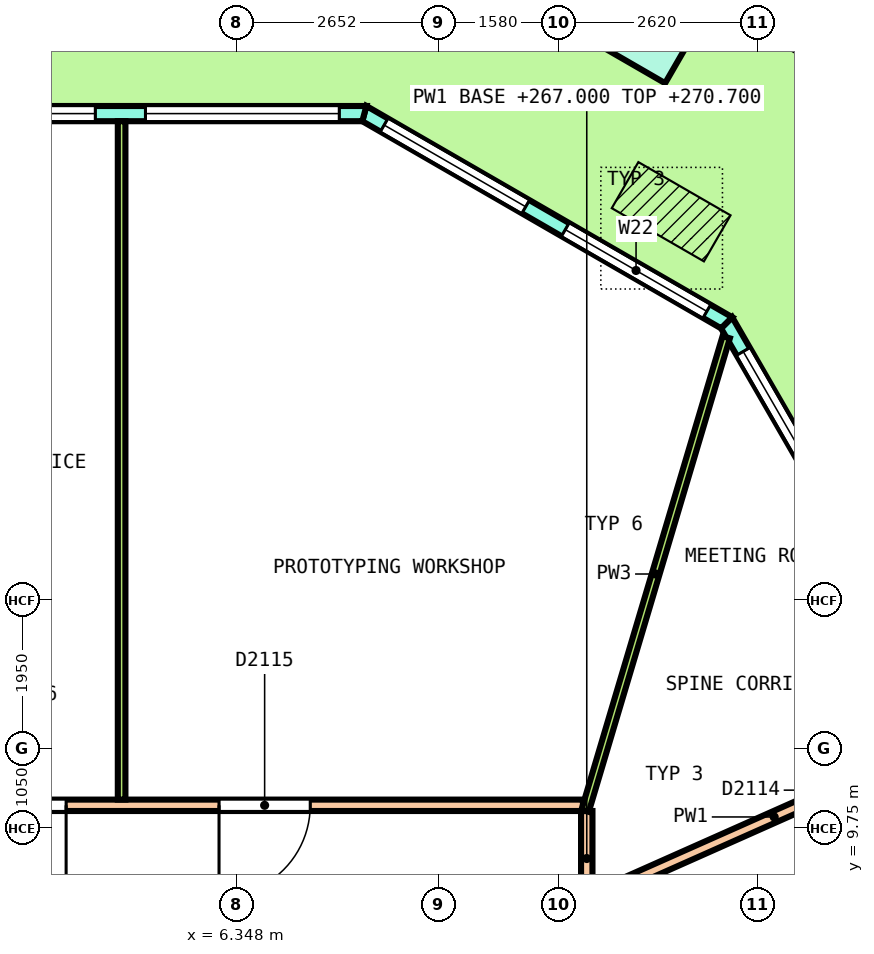
"""IFC4 building model, lengths in metres.
Left out: names, types, materials, properties, quantities, classifications, styles, units other than length and angle.
Written with IfcOpenShell. Run it as: python <this file> out.ifc"""

import sys

from ifc_helpers import new_model, si_unit, direction, frame, frame_2d, origin, origin_2d, place, context, subcontext, project, spatial, polyline, rectangle, outline, extrude, element, fill, save


model = new_model("IFC4")
c1 = context("Model", 3, precision=1e-05, world=origin(), true_north=direction((0.0, 1.0)))
c2 = subcontext(c1, "Body", "Model", "MODEL_VIEW")
j1 = project(units=[si_unit("LENGTHUNIT", "METRE"), si_unit("PLANEANGLEUNIT", "RADIAN")], contexts=[c1])
p1 = place(None, origin())
s1 = spatial("IfcSite", under=j1, at=p1, CompositionType="ELEMENT")
p2 = place(p1, origin())
s2 = spatial("IfcBuilding", under=s1, at=p2, CompositionType="ELEMENT")
p3 = place(p2, frame((0.0, 0.0, 267.0)))
s3 = spatial("IfcBuildingStorey", under=s2, at=p3, CompositionType="ELEMENT", Elevation=267.0)
p4 = place(p3, frame((11.807, 20.199, 0.0), z_axis=(0.036230378439, 0.0, 0.99934346432), x_axis=(-0.865314641241, 0.500246354177, 0.031371273281)))
e1 = element("IfcColumn", 1, at=p4, inside=s3, PredefinedType="COLUMN", context=c2, shape_type="SweptSolid", body=[
    extrude(rectangle(XDim=0.95, YDim=0.95, at=origin_2d()), origin(), (0.0, 0.0, 1.0), 3.652),
])
p5 = place(p3, frame((20.596, 2.877, 0.0), z_axis=(0.0, 0.0, 1.0), x_axis=(-0.500008968961, 0.86602022549, 0.0)))
e2 = element("IfcWall", 2, at=p5, inside=s3, PredefinedType="SOLIDWALL", context=c2, shape_type="SweptSolid", body=[
    extrude(outline(polyline([(-0.027, -0.1), (1.018, -0.1), (2.062, -0.1), (3.106, -0.1), (4.151, -0.1), (5.195, -0.1), (6.24, -0.1), (7.284, -0.1), (8.328, -0.1), (9.373, -0.1), (10.417, -0.1), (11.462, -0.1), (12.506, -0.1), (13.551, -0.1), (14.595, -0.1), (15.639, -0.1), (15.586, 0.1), (14.548, 0.1), (13.511, 0.1), (12.474, 0.1), (11.437, 0.1), (10.399, 0.1), (9.362, 0.1), (8.325, 0.1), (7.288, 0.1), (6.25, 0.1), (5.213, 0.1), (4.176, 0.1), (3.139, 0.1), (2.101, 0.1), (1.064, 0.1), (0.027, 0.1), (-0.027, -0.1)])), origin(), (0.0, 0.0, 1.0), 3.7),
])
p6 = place(p5, frame((0.436, 0.0, 0.1)))
e3 = element("IfcOpeningElement", 3, at=p6, cuts=e2, PredefinedType="OPENING", context=c2, shape_type="SweptSolid", body=[
    extrude(rectangle(XDim=2.25, YDim=2.75, at=frame_2d((1.125, 1.375))), frame((0.0, 0.11, 0.0), z_axis=(0.0, -1.0, 0.0), x_axis=(1.0, 0.0, 0.0)), (0.0, 0.0, 1.0), 0.22),
])
p7 = place(p5, frame((3.559, 0.0, 0.1)))
e4 = element("IfcOpeningElement", 4, at=p7, cuts=e2, PredefinedType="OPENING", context=c2, shape_type="SweptSolid", body=[
    extrude(rectangle(XDim=2.25, YDim=2.75, at=frame_2d((1.125, 1.375))), frame((0.0, 0.11, 0.0), z_axis=(0.0, -1.0, 0.0), x_axis=(1.0, 0.0, 0.0)), (0.0, 0.0, 1.0), 0.22),
])
p8 = place(p5, frame((6.906, 0.0, 0.0)))
e5 = element("IfcOpeningElement", 5, at=p8, cuts=e2, PredefinedType="OPENING", context=c2, shape_type="SweptSolid", body=[
    extrude(rectangle(XDim=1.8, YDim=2.4, at=frame_2d((0.9, 1.2))), frame((0.0, 0.11, 0.0), z_axis=(0.0, -1.0, 0.0), x_axis=(1.0, 0.0, 0.0)), (0.0, 0.0, 1.0), 0.22),
])
p9 = place(p5, frame((6.906, 0.0, 2.55)))
e6 = element("IfcOpeningElement", 6, at=p9, cuts=e2, PredefinedType="OPENING", context=c2, shape_type="SweptSolid", body=[
    extrude(rectangle(XDim=1.8, YDim=0.3, at=frame_2d((0.9, 0.15))), frame((0.0, 0.11, 0.0), z_axis=(0.0, -1.0, 0.0), x_axis=(1.0, 0.0, 0.0)), (0.0, 0.0, 1.0), 0.22),
])
p10 = place(p5, frame((9.804, 0.0, 0.1)))
e7 = element("IfcOpeningElement", 7, at=p10, cuts=e2, PredefinedType="OPENING", context=c2, shape_type="SweptSolid", body=[
    extrude(rectangle(XDim=2.25, YDim=2.75, at=frame_2d((1.125, 1.375))), frame((0.0, 0.11, 0.0), z_axis=(0.0, -1.0, 0.0), x_axis=(1.0, 0.0, 0.0)), (0.0, 0.0, 1.0), 0.22),
])
p11 = place(p5, frame((12.926, 0.0, 0.1)))
e8 = element("IfcOpeningElement", 8, at=p11, cuts=e2, PredefinedType="OPENING", context=c2, shape_type="SweptSolid", body=[
    extrude(rectangle(XDim=2.25, YDim=2.75, at=frame_2d((1.125, 1.375))), frame((0.0, 0.11, 0.0), z_axis=(0.0, -1.0, 0.0), x_axis=(1.0, 0.0, 0.0)), (0.0, 0.0, 1.0), 0.22),
])
p12 = place(p3, frame((12.79, 16.398, 0.0), z_axis=(0.0, 0.0, 1.0), x_axis=(-0.866026017613, 0.499998936816, 0.0)))
e9 = element("IfcWall", 9, at=p12, inside=s3, PredefinedType="SOLIDWALL", context=c2, shape_type="SweptSolid", body=[
    extrude(outline(polyline([(-0.027, -0.1), (1.084, -0.1), (2.196, -0.1), (3.307, -0.1), (4.419, -0.1), (5.53, -0.1), (5.477, 0.1), (4.387, 0.1), (3.297, 0.1), (2.207, 0.1), (1.117, 0.1), (0.027, 0.1), (-0.027, -0.1)])), origin(), (0.0, 0.0, 1.0), 3.7),
])
p13 = place(p12, frame((0.301, 0.0, 0.1)))
e10 = element("IfcOpeningElement", 10, at=p13, cuts=e9, PredefinedType="OPENING", context=c2, shape_type="SweptSolid", body=[
    extrude(rectangle(XDim=2.15, YDim=2.75, at=frame_2d((1.075, 1.375))), frame((0.0, 0.11, 0.0), z_axis=(0.0, -1.0, 0.0), x_axis=(1.0, 0.0, 0.0)), (0.0, 0.0, 1.0), 0.22),
])
p14 = place(p12, frame((3.052, 0.0, 0.1)))
e11 = element("IfcOpeningElement", 11, at=p14, cuts=e9, PredefinedType="OPENING", context=c2, shape_type="SweptSolid", body=[
    extrude(rectangle(XDim=2.15, YDim=2.75, at=frame_2d((1.075, 1.375))), frame((0.0, 0.11, 0.0), z_axis=(0.0, -1.0, 0.0), x_axis=(1.0, 0.0, 0.0)), (0.0, 0.0, 1.0), 0.22),
])
p15 = place(p3, frame((8.024, 19.15, 0.0), z_axis=(0.0, 0.0, 1.0), x_axis=(-1.0, 0.0, 0.0)))
e12 = element("IfcWall", 12, at=p15, inside=s3, PredefinedType="SOLIDWALL", context=c2, shape_type="SweptSolid", body=[
    extrude(outline(polyline([(-0.027, -0.1), (0.979, -0.1), (1.986, -0.1), (2.992, -0.1), (3.999, -0.1), (5.005, -0.1), (6.011, -0.1), (7.018, -0.1), (8.024, -0.1), (9.03, -0.1), (10.037, -0.1), (11.043, -0.1), (12.049, -0.1), (13.056, -0.1), (14.062, -0.1), (15.068, -0.1), (16.075, -0.1), (16.021, 0.1), (15.021, 0.1), (14.022, 0.1), (13.022, 0.1), (12.022, 0.1), (11.023, 0.1), (10.023, 0.1), (9.023, 0.1), (8.024, 0.1), (7.024, 0.1), (6.025, 0.1), (5.025, 0.1), (4.025, 0.1), (3.026, 0.1), (2.026, 0.1), (1.026, 0.1), (0.027, 0.1), (-0.027, -0.1)])), origin(), (0.0, 0.0, 1.0), 3.7),
])
p16 = place(p15, frame((0.33, 0.0, 0.1)))
e13 = element("IfcOpeningElement", 13, at=p16, cuts=e12, PredefinedType="OPENING", context=c2, shape_type="SweptSolid", body=[
    extrude(rectangle(XDim=2.55, YDim=2.75, at=frame_2d((1.275, 1.375))), frame((0.0, 0.11, 0.0), z_axis=(0.0, -1.0, 0.0), x_axis=(1.0, 0.0, 0.0)), (0.0, 0.0, 1.0), 0.22),
])
p17 = place(p15, frame((3.539, 0.0, 0.1)))
e14 = element("IfcOpeningElement", 14, at=p17, cuts=e12, PredefinedType="OPENING", context=c2, shape_type="SweptSolid", body=[
    extrude(rectangle(XDim=2.55, YDim=2.75, at=frame_2d((1.275, 1.375))), frame((0.0, 0.11, 0.0), z_axis=(0.0, -1.0, 0.0), x_axis=(1.0, 0.0, 0.0)), (0.0, 0.0, 1.0), 0.22),
])
p18 = place(p15, frame((7.124, 0.0, 0.0)))
e15 = element("IfcOpeningElement", 15, at=p18, cuts=e12, PredefinedType="OPENING", context=c2, shape_type="SweptSolid", body=[
    extrude(rectangle(XDim=1.8, YDim=2.4, at=frame_2d((0.9, 1.2))), frame((0.0, 0.11, 0.0), z_axis=(0.0, -1.0, 0.0), x_axis=(1.0, 0.0, 0.0)), (0.0, 0.0, 1.0), 0.22),
])
p19 = place(p15, frame((7.124, 0.0, 2.55)))
e16 = element("IfcOpeningElement", 16, at=p19, cuts=e12, PredefinedType="OPENING", context=c2, shape_type="SweptSolid", body=[
    extrude(rectangle(XDim=1.8, YDim=0.3, at=frame_2d((0.9, 0.15))), frame((0.0, 0.11, 0.0), z_axis=(0.0, -1.0, 0.0), x_axis=(1.0, 0.0, 0.0)), (0.0, 0.0, 1.0), 0.22),
])
p20 = place(p15, frame((9.958, 0.0, 0.1)))
e17 = element("IfcOpeningElement", 17, at=p20, cuts=e12, PredefinedType="OPENING", context=c2, shape_type="SweptSolid", body=[
    extrude(rectangle(XDim=2.55, YDim=2.75, at=frame_2d((1.275, 1.375))), frame((0.0, 0.11, 0.0), z_axis=(0.0, -1.0, 0.0), x_axis=(1.0, 0.0, 0.0)), (0.0, 0.0, 1.0), 0.22),
])
p21 = place(p15, frame((13.168, 0.0, 0.1)))
e18 = element("IfcOpeningElement", 18, at=p21, cuts=e12, PredefinedType="OPENING", context=c2, shape_type="SweptSolid", body=[
    extrude(rectangle(XDim=2.55, YDim=2.75, at=frame_2d((1.275, 1.375))), frame((0.0, 0.11, 0.0), z_axis=(0.0, -1.0, 0.0), x_axis=(1.0, 0.0, 0.0)), (0.0, 0.0, 1.0), 0.22),
])
p22 = place(p3, frame((11.019, 8.831, 0.0), z_axis=(0.0, 0.0, 1.0), x_axis=(0.91370022721, 0.406388846792, 0.0)))
e19 = element("IfcWall", 19, at=p22, inside=s3, PredefinedType="PARTITIONING", context=c2, shape_type="SweptSolid", body=[
    extrude(rectangle(XDim=5.247, YDim=0.15, at=frame_2d((2.624, 0.0))), origin(), (0.0, 0.0, 1.0), 2.9),
])
p23 = place(p22, frame((2.992, 0.0, 0.0)))
e20 = element("IfcOpeningElement", 20, at=p23, cuts=e19, PredefinedType="OPENING", context=c2, shape_type="SweptSolid", body=[
    extrude(rectangle(XDim=1.0, YDim=2.1, at=frame_2d((0.5, 1.05))), frame((0.0, 0.085, 0.0), z_axis=(0.0, -1.0, 0.0), x_axis=(1.0, 0.0, 0.0)), (0.0, 0.0, 1.0), 0.17),
])
p24 = place(p3, frame((10.95, 8.725, 0.0), z_axis=(0.0, 0.0, 1.0), x_axis=(0.0, 1.0, 0.0)))
e21 = element("IfcWall", 21, at=p24, inside=s3, PredefinedType="PARTITIONING", context=c2, shape_type="SweptSolid", body=[
    extrude(rectangle(XDim=1.25, YDim=0.15, at=frame_2d((0.625, 0.0))), origin(), (0.0, 0.0, 1.0), 3.7),
])
p25 = place(p3, frame((-10.875, 10.05, 0.0), z_axis=(0.0, 0.0, 1.0), x_axis=(1.0, 0.0, 0.0)))
e22 = element("IfcWall", 22, at=p25, inside=s3, PredefinedType="PARTITIONING", context=c2, shape_type="SweptSolid", body=[
    extrude(rectangle(XDim=21.775, YDim=0.15, at=frame_2d((10.887, 0.0))), origin(), (0.0, 0.0, 1.0), 2.9),
])
p26 = place(p25, frame((16.987, 0.0, 0.0)))
e23 = element("IfcOpeningElement", 23, at=p26, cuts=e22, PredefinedType="OPENING", context=c2, shape_type="SweptSolid", body=[
    extrude(rectangle(XDim=1.2, YDim=2.1, at=frame_2d((0.6, 1.05))), frame((0.0, 0.085, 0.0), z_axis=(0.0, -1.0, 0.0), x_axis=(1.0, 0.0, 0.0)), (0.0, 0.0, 1.0), 0.17),
])
p27 = place(p25, frame((13.975, 0.0, 0.0)))
e24 = element("IfcOpeningElement", 24, at=p27, cuts=e22, PredefinedType="OPENING", context=c2, shape_type="SweptSolid", body=[
    extrude(rectangle(XDim=1.0, YDim=2.1, at=frame_2d((0.5, 1.05))), frame((0.0, 0.085, 0.0), z_axis=(0.0, -1.0, 0.0), x_axis=(1.0, 0.0, 0.0)), (0.0, 0.0, 1.0), 0.17),
])
p28 = place(p25, frame((7.58, 0.0, 0.0)))
e25 = element("IfcOpeningElement", 25, at=p28, cuts=e22, PredefinedType="OPENING", context=c2, shape_type="SweptSolid", body=[
    extrude(rectangle(XDim=1.0, YDim=2.1, at=frame_2d((0.5, 1.05))), frame((0.0, 0.085, 0.0), z_axis=(0.0, -1.0, 0.0), x_axis=(1.0, 0.0, 0.0)), (0.0, 0.0, 1.0), 0.17),
])
p29 = place(p25, frame((4.314, 0.0, 0.0)))
e26 = element("IfcOpeningElement", 26, at=p29, cuts=e22, PredefinedType="OPENING", context=c2, shape_type="SweptSolid", body=[
    extrude(rectangle(XDim=1.0, YDim=2.1, at=frame_2d((0.5, 1.05))), frame((0.0, 0.085, 0.0), z_axis=(0.0, -1.0, 0.0), x_axis=(1.0, 0.0, 0.0)), (0.0, 0.0, 1.0), 0.17),
])
p30 = place(p25, frame((1.227, 0.0, 0.0)))
e27 = element("IfcOpeningElement", 27, at=p30, cuts=e22, PredefinedType="OPENING", context=c2, shape_type="SweptSolid", body=[
    extrude(rectangle(XDim=1.0, YDim=2.1, at=frame_2d((0.5, 1.05))), frame((0.0, 0.085, 0.0), z_axis=(0.0, -1.0, 0.0), x_axis=(1.0, 0.0, 0.0)), (0.0, 0.0, 1.0), 0.17),
])
p31 = place(p3, frame((10.929, 9.978, 0.0), z_axis=(0.0, 0.0, 1.0), x_axis=(0.285517689568, 0.958373439189, 0.0)))
e28 = element("IfcWall", 28, at=p31, inside=s3, PredefinedType="PARTITIONING", context=c2, shape_type="SweptSolid", body=[
    extrude(rectangle(XDim=6.5, YDim=0.1, at=frame_2d((3.25, 0.0))), origin(), (0.0, 0.0, 1.0), 2.9),
])
p32 = place(p3, frame((4.831, 10.125, 0.0), z_axis=(0.0, 0.0, 1.0), x_axis=(0.0, 1.0, 0.0)))
e29 = element("IfcWall", 29, at=p32, inside=s3, PredefinedType="PARTITIONING", context=c2, shape_type="SweptSolid", body=[
    extrude(rectangle(XDim=8.925, YDim=0.1, at=frame_2d((4.462, 0.0))), origin(), (0.0, 0.0, 1.0), 2.9),
])
p33 = place(p11, origin())
e30 = element("IfcWindow", 30, at=p33, inside=s3, PartitioningType="SINGLE_PANEL", PredefinedType="WINDOW", context=c2, shape_type="SweptSolid", body=[
    extrude(rectangle(XDim=2.25, YDim=2.75, at=frame_2d((1.125, 1.375))), frame((0.0, 0.03, 0.0), z_axis=(0.0, -1.0, 0.0), x_axis=(1.0, 0.0, 0.0)), (0.0, 0.0, 1.0), 0.06),
])
fill(e8, e30)
p34 = place(p13, origin())
e31 = element("IfcWindow", 31, at=p34, inside=s3, PartitioningType="SINGLE_PANEL", PredefinedType="WINDOW", context=c2, shape_type="SweptSolid", body=[
    extrude(rectangle(XDim=2.15, YDim=2.75, at=frame_2d((1.075, 1.375))), frame((0.0, 0.03, 0.0), z_axis=(0.0, -1.0, 0.0), x_axis=(1.0, 0.0, 0.0)), (0.0, 0.0, 1.0), 0.06),
])
fill(e10, e31)
p35 = place(p14, origin())
e32 = element("IfcWindow", 32, at=p35, inside=s3, PartitioningType="SINGLE_PANEL", PredefinedType="WINDOW", context=c2, shape_type="SweptSolid", body=[
    extrude(rectangle(XDim=2.15, YDim=2.75, at=frame_2d((1.075, 1.375))), frame((0.0, 0.03, 0.0), z_axis=(0.0, -1.0, 0.0), x_axis=(1.0, 0.0, 0.0)), (0.0, 0.0, 1.0), 0.06),
])
fill(e11, e32)
p36 = place(p16, origin())
e33 = element("IfcWindow", 33, at=p36, inside=s3, PartitioningType="SINGLE_PANEL", PredefinedType="WINDOW", context=c2, shape_type="SweptSolid", body=[
    extrude(rectangle(XDim=2.55, YDim=2.75, at=frame_2d((1.275, 1.375))), frame((0.0, 0.03, 0.0), z_axis=(0.0, -1.0, 0.0), x_axis=(1.0, 0.0, 0.0)), (0.0, 0.0, 1.0), 0.06),
])
fill(e13, e33)
p37 = place(p17, origin())
e34 = element("IfcWindow", 34, at=p37, inside=s3, PartitioningType="SINGLE_PANEL", PredefinedType="WINDOW", context=c2, shape_type="SweptSolid", body=[
    extrude(rectangle(XDim=2.55, YDim=2.75, at=frame_2d((1.275, 1.375))), frame((0.0, 0.03, 0.0), z_axis=(0.0, -1.0, 0.0), x_axis=(1.0, 0.0, 0.0)), (0.0, 0.0, 1.0), 0.06),
])
fill(e14, e34)
p38 = place(p26, origin())
e35 = element("IfcDoor", 35, at=p38, inside=s3, OperationType="DOUBLE_DOOR_SINGLE_SWING", PredefinedType="DOOR", context=c2, shape_type="SweptSolid", body=[
    extrude(rectangle(XDim=1.2, YDim=2.1, at=frame_2d((0.6, 1.05))), frame((0.0, 0.025, 0.0), z_axis=(0.0, -1.0, 0.0), x_axis=(1.0, 0.0, 0.0)), (0.0, 0.0, 1.0), 0.05),
])
fill(e23, e35)
p39 = place(p27, origin())
e36 = element("IfcDoor", 36, at=p39, inside=s3, OperationType="SINGLE_SWING_LEFT", PredefinedType="DOOR", context=c2, shape_type="SweptSolid", body=[
    extrude(rectangle(XDim=1.0, YDim=2.1, at=frame_2d((0.5, 1.05))), frame((0.0, 0.025, 0.0), z_axis=(0.0, -1.0, 0.0), x_axis=(1.0, 0.0, 0.0)), (0.0, 0.0, 1.0), 0.05),
])
fill(e24, e36)
save(model, sys.argv[1])
